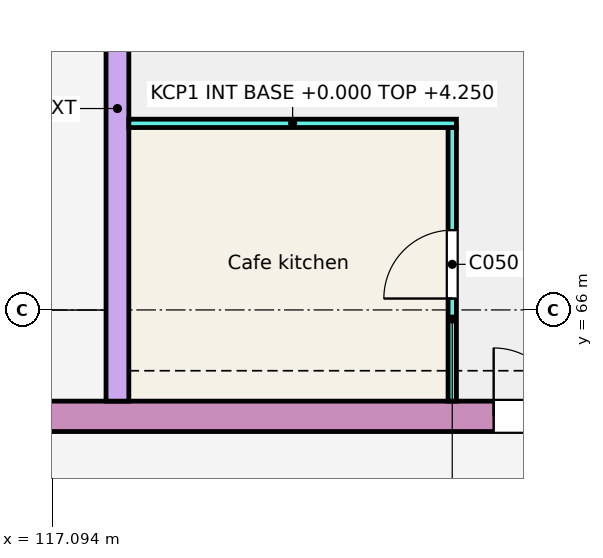
"""IFC4 building model, lengths in metres.
Left out: names, types, materials, properties, quantities, classifications, styles, units other than length and angle.
Written with IfcOpenShell. Run it as: python <this file> out.ifc"""

import sys

from ifc_helpers import new_model, si_unit, direction, frame, frame_2d, origin, place, context, subcontext, project, spatial, rectangle, extrude, element, fill, save


model = new_model("IFC4")
c1 = context("Model", 3, precision=1e-05, world=origin(), true_north=direction((0.0, 1.0)))
c2 = subcontext(c1, "Body", "Model", "MODEL_VIEW")
j1 = project(units=[si_unit("LENGTHUNIT", "METRE"), si_unit("PLANEANGLEUNIT", "RADIAN")], contexts=[c1])
p1 = place(None, origin())
s1 = spatial("IfcSite", under=j1, at=p1, CompositionType="ELEMENT")
p2 = place(p1, origin())
s2 = spatial("IfcBuilding", under=s1, at=p2, CompositionType="ELEMENT")
p3 = place(p2, origin())
s3 = spatial("IfcBuildingStorey", under=s2, at=p3, CompositionType="ELEMENT", Elevation=0.0)
p4 = place(p3, frame((114.8, 64.6, -0.25), z_axis=(0.0, 0.0, 1.0), x_axis=(1.0, 0.0, 0.0)))
e1 = element("IfcWall", 1, at=p4, inside=s3, PredefinedType="SOLIDWALL", context=c2, shape_type="SweptSolid", body=[
    extrude(rectangle(XDim=30.0, YDim=0.4, at=frame_2d((15.0, 0.0))), origin(), (0.0, 0.0, 1.0), 3.25),
])
p5 = place(p4, frame((8.1, 0.0, 0.25)))
e2 = element("IfcOpeningElement", 2, at=p5, cuts=e1, PredefinedType="OPENING", context=c2, shape_type="SweptSolid", body=[
    extrude(rectangle(XDim=1.8, YDim=2.1, at=frame_2d((0.9, 1.05))), frame((0.0, 0.21, 0.0), z_axis=(0.0, -1.0, 0.0), x_axis=(1.0, 0.0, 0.0)), (0.0, 0.0, 1.0), 0.42),
])
p6 = place(p4, frame((14.1, 0.0, 0.25)))
e3 = element("IfcOpeningElement", 3, at=p6, cuts=e1, PredefinedType="OPENING", context=c2, shape_type="SweptSolid", body=[
    extrude(rectangle(XDim=1.8, YDim=2.1, at=frame_2d((0.9, 1.05))), frame((0.0, 0.21, 0.0), z_axis=(0.0, -1.0, 0.0), x_axis=(1.0, 0.0, 0.0)), (0.0, 0.0, 1.0), 0.42),
])
p7 = place(p4, frame((20.1, 0.0, 0.25)))
e4 = element("IfcOpeningElement", 4, at=p7, cuts=e1, PredefinedType="OPENING", context=c2, shape_type="SweptSolid", body=[
    extrude(rectangle(XDim=1.8, YDim=2.1, at=frame_2d((0.9, 1.05))), frame((0.0, 0.21, 0.0), z_axis=(0.0, -1.0, 0.0), x_axis=(1.0, 0.0, 0.0)), (0.0, 0.0, 1.0), 0.42),
])
p8 = place(p3, frame((117.95, 64.8, -0.25), z_axis=(0.0, 0.0, 1.0), x_axis=(0.0, 1.0, 0.0)))
e5 = element("IfcWall", 5, at=p8, inside=s3, PredefinedType="SOLIDWALL", context=c2, shape_type="SweptSolid", body=[
    extrude(rectangle(XDim=7.7, YDim=0.3, at=frame_2d((3.85, 0.0))), origin(), (0.0, 0.0, 1.0), 4.5),
])
p9 = place(p3, frame((122.355, 64.8, 0.0), z_axis=(0.0, 0.0, 1.0), x_axis=(0.0, 1.0, 0.0)))
e6 = element("IfcWall", 6, at=p9, inside=s3, PredefinedType="PARTITIONING", context=c2, shape_type="SweptSolid", body=[
    extrude(rectangle(XDim=3.6, YDim=0.11, at=frame_2d((1.8, 0.0))), origin(), (0.0, 0.0, 1.0), 4.25),
])
p10 = place(p9, frame((1.35, 0.0, 0.0)))
e7 = element("IfcOpeningElement", 7, at=p10, cuts=e6, PredefinedType="OPENING", context=c2, shape_type="SweptSolid", body=[
    extrude(rectangle(XDim=0.9, YDim=2.1, at=frame_2d((0.45, 1.05))), frame((0.0, 0.065, 0.0), z_axis=(0.0, -1.0, 0.0), x_axis=(1.0, 0.0, 0.0)), (0.0, 0.0, 1.0), 0.13),
])
p11 = place(p3, frame((118.1, 68.455, 0.0), z_axis=(0.0, 0.0, 1.0), x_axis=(1.0, 0.0, 0.0)))
e8 = element("IfcWall", 8, at=p11, inside=s3, PredefinedType="PARTITIONING", context=c2, shape_type="SweptSolid", body=[
    extrude(rectangle(XDim=4.31, YDim=0.11, at=frame_2d((2.155, 0.0))), origin(), (0.0, 0.0, 1.0), 4.25),
])
p12 = place(p5, origin())
e9 = element("IfcDoor", 9, at=p12, inside=s3, OperationType="DOUBLE_DOOR_SINGLE_SWING", PredefinedType="DOOR", context=c2, shape_type="SweptSolid", body=[
    extrude(rectangle(XDim=1.8, YDim=2.1, at=frame_2d((0.9, 1.05))), frame((0.0, 0.025, 0.0), z_axis=(0.0, -1.0, 0.0), x_axis=(1.0, 0.0, 0.0)), (0.0, 0.0, 1.0), 0.05),
])
fill(e2, e9)
p13 = place(p10, origin())
e10 = element("IfcDoor", 10, at=p13, inside=s3, OperationType="SINGLE_SWING_LEFT", PredefinedType="DOOR", context=c2, shape_type="SweptSolid", body=[
    extrude(rectangle(XDim=0.9, YDim=2.1, at=frame_2d((0.45, 1.05))), frame((0.0, 0.025, 0.0), z_axis=(0.0, -1.0, 0.0), x_axis=(1.0, 0.0, 0.0)), (0.0, 0.0, 1.0), 0.05),
])
fill(e7, e10)
save(model, sys.argv[1])
